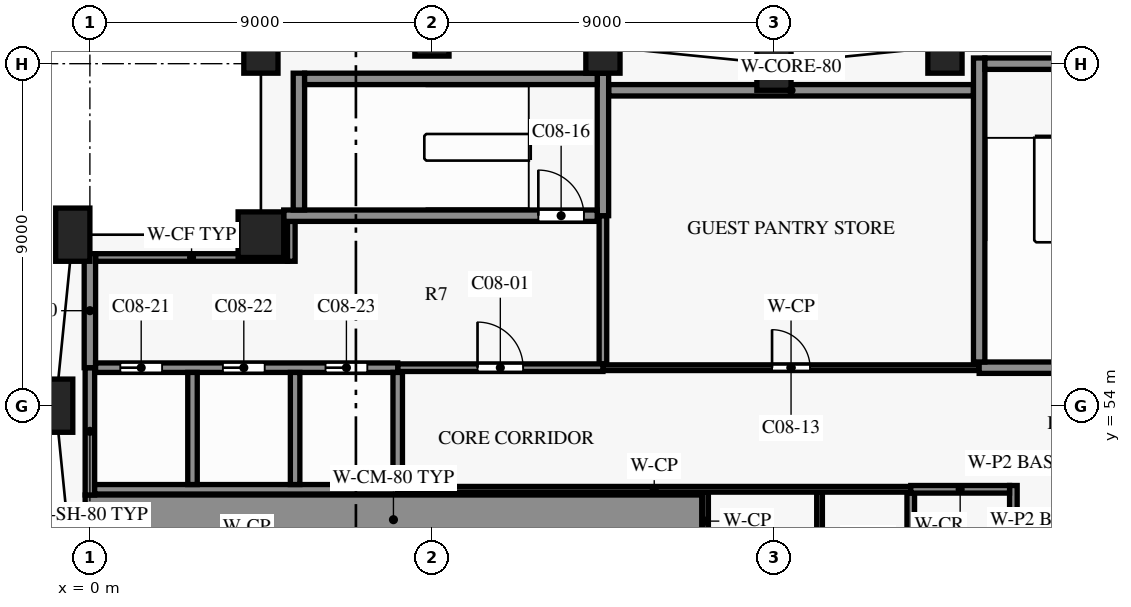
"""IFC4 building model, lengths in metres.
Left out: names, types, materials, properties, quantities, classifications, styles, units other than length and angle.
Written with IfcOpenShell. Run it as: python <this file> out.ifc"""

import sys

from ifc_helpers import new_model, si_unit, direction, frame, frame_2d, origin, origin_2d, place, context, subcontext, project, spatial, rectangle, extrude, element, fill, save


model = new_model("IFC4")
c1 = context("Model", 3, precision=1e-05, world=origin(), true_north=direction((0.0, 1.0)))
c2 = subcontext(c1, "Body", "Model", "MODEL_VIEW")
j1 = project(units=[si_unit("LENGTHUNIT", "METRE"), si_unit("PLANEANGLEUNIT", "RADIAN")], contexts=[c1])
p1 = place(None, origin())
s1 = spatial("IfcSite", under=j1, at=p1, CompositionType="ELEMENT")
p2 = place(p1, origin())
s2 = spatial("IfcBuilding", under=s1, at=p2, CompositionType="ELEMENT")
p3 = place(p2, frame((0.0, 0.0, 41.1)))
s3 = spatial("IfcBuildingStorey", under=s2, at=p3, CompositionType="ELEMENT", Elevation=41.1)
for number, where, z_axis, x_axis in (
    (1, (22.5, 63.45, 0.0), (0.0, 0.0, 1.0), (-0.995, -0.1, 0.0)),
    (2, (18.0, 63.0, 0.0), (0.0, 0.0, 1.0), (-1.0, 0.0, 0.0)),
    (3, (13.5, 63.45, 0.0), (0.0, 0.0, 1.0), (-0.995, 0.1, 0.0)),
    (4, (9.0, 63.9, 0.0), (0.0, 0.0, 1.0), (-1.0, 0.0, 0.0)),
    (5, (4.5, 63.45, 0.0), (0.0, 0.0, 1.0), (-0.995, -0.1, 0.0)),
    (6, (-0.45, 58.5, 0.0), (0.0, 0.0, 1.0), (-0.1, -0.995, 0.0)),
    (7, (-0.9, 54.0, 0.0), (0.0, 0.0, 1.0), (0.0, -1.0, 0.0)),
):
    element("IfcColumn", number, at=place(p3, frame(where, z_axis=z_axis, x_axis=x_axis)), inside=s3, PredefinedType="COLUMN", context=c2, shape_type="SweptSolid", body=[
        extrude(rectangle(XDim=0.9, YDim=1.4, at=origin_2d()), origin(), (0.0, 0.0, 1.0), 3.6),
    ])
p4 = place(p3, frame((4.5, 58.5, 0.0), z_axis=(0.0, 0.0, 1.0), x_axis=(1.0, 0.0, 0.0)))
e8 = element("IfcColumn", 8, at=p4, inside=s3, PredefinedType="COLUMN", context=c2, shape_type="SweptSolid", body=[
    extrude(rectangle(XDim=1.2, YDim=1.2, at=origin_2d()), origin(), (0.0, 0.0, 1.0), 3.6),
])
p5 = place(p3, frame((-0.125, 51.0, 0.0), z_axis=(0.0, 0.0, 1.0), x_axis=(1.0, 0.0, 0.0)))
e9 = element("IfcWall", 9, at=p5, inside=s3, PredefinedType="SHEAR", context=c2, shape_type="SweptSolid", body=[
    extrude(rectangle(XDim=16.225, YDim=1.3, at=frame_2d((8.113, 0.0))), origin(), (0.0, 0.0, 1.0), 3.3),
])
p6 = place(p3, frame((8.1, 51.8, 0.0), z_axis=(0.0, 0.0, 1.0), x_axis=(1.0, 0.0, 0.0)))
e10 = element("IfcWall", 10, at=p6, inside=s3, PredefinedType="PARTITIONING", context=c2, shape_type="SweptSolid", body=[
    extrude(rectangle(XDim=13.5, YDim=0.15, at=frame_2d((6.75, 0.0))), origin(), (0.0, 0.0, 1.0), 3.3),
])
p7 = place(p3, frame((21.6, 51.8, 0.0), z_axis=(0.0, 0.0, 1.0), x_axis=(1.0, 0.0, 0.0)))
e11 = element("IfcWall", 11, at=p7, inside=s3, PredefinedType="PARTITIONING", context=c2, shape_type="SweptSolid", body=[
    extrude(rectangle(XDim=2.6, YDim=0.2, at=frame_2d((1.3, 0.0))), origin(), (0.0, 0.0, 1.0), 3.3),
])
p8 = place(p3, frame((0.125, 51.8, 0.0), z_axis=(0.0, 0.0, 1.0), x_axis=(1.0, 0.0, 0.0)))
e12 = element("IfcWall", 12, at=p8, inside=s3, PredefinedType="SHEAR", context=c2, shape_type="SweptSolid", body=[
    extrude(rectangle(XDim=7.975, YDim=0.25, at=frame_2d((3.988, 0.0))), origin(), (0.0, 0.0, 1.0), 3.3),
])
p9 = place(p3, frame((8.1, 55.0, 0.0), z_axis=(0.0, 0.0, 1.0), x_axis=(1.0, 0.0, 0.0)))
e13 = element("IfcWall", 13, at=p9, inside=s3, PredefinedType="PARTITIONING", context=c2, shape_type="SweptSolid", body=[
    extrude(rectangle(XDim=5.4, YDim=0.2, at=frame_2d((2.7, 0.0))), origin(), (0.0, 0.0, 1.0), 3.3),
])
p10 = place(p9, frame((2.1, 0.0, 0.0)))
e14 = element("IfcOpeningElement", 14, at=p10, cuts=e13, PredefinedType="OPENING", context=c2, shape_type="SweptSolid", body=[
    extrude(rectangle(XDim=1.2, YDim=2.2, at=frame_2d((0.6, 1.1))), frame((0.0, 0.11, 0.0), z_axis=(0.0, -1.0, 0.0), x_axis=(1.0, 0.0, 0.0)), (0.0, 0.0, 1.0), 0.22),
])
p11 = place(p3, frame((13.5, 55.0, 0.0), z_axis=(0.0, 0.0, 1.0), x_axis=(1.0, 0.0, 0.0)))
e15 = element("IfcWall", 15, at=p11, inside=s3, PredefinedType="PARTITIONING", context=c2, shape_type="SweptSolid", body=[
    extrude(rectangle(XDim=9.9, YDim=0.15, at=frame_2d((4.95, 0.0))), origin(), (0.0, 0.0, 1.0), 3.3),
])
p12 = place(p11, frame((4.45, 0.0, 0.0)))
e16 = element("IfcOpeningElement", 16, at=p12, cuts=e15, PredefinedType="OPENING", context=c2, shape_type="SweptSolid", body=[
    extrude(rectangle(XDim=1.0, YDim=2.1, at=frame_2d((0.5, 1.05))), frame((0.0, 0.085, 0.0), z_axis=(0.0, -1.0, 0.0), x_axis=(1.0, 0.0, 0.0)), (0.0, 0.0, 1.0), 0.17),
])
p13 = place(p3, frame((0.15, 55.0, 0.0), z_axis=(0.0, 0.0, 1.0), x_axis=(1.0, 0.0, 0.0)))
e17 = element("IfcWall", 17, at=p13, inside=s3, PredefinedType="SHEAR", context=c2, shape_type="SweptSolid", body=[
    extrude(rectangle(XDim=7.95, YDim=0.25, at=frame_2d((3.975, 0.0))), origin(), (0.0, 0.0, 1.0), 3.3),
])
p14 = place(p13, frame((0.65, 0.0, 0.0)))
e18 = element("IfcOpeningElement", 18, at=p14, cuts=e17, PredefinedType="OPENING", context=c2, shape_type="SweptSolid", body=[
    extrude(rectangle(XDim=1.1, YDim=2.1, at=frame_2d((0.55, 1.05))), frame((0.0, 0.135, 0.0), z_axis=(0.0, -1.0, 0.0), x_axis=(1.0, 0.0, 0.0)), (0.0, 0.0, 1.0), 0.27),
])
p15 = place(p13, frame((3.35, 0.0, 0.0)))
e19 = element("IfcOpeningElement", 19, at=p15, cuts=e17, PredefinedType="OPENING", context=c2, shape_type="SweptSolid", body=[
    extrude(rectangle(XDim=1.1, YDim=2.1, at=frame_2d((0.55, 1.05))), frame((0.0, 0.135, 0.0), z_axis=(0.0, -1.0, 0.0), x_axis=(1.0, 0.0, 0.0)), (0.0, 0.0, 1.0), 0.27),
])
p16 = place(p13, frame((6.05, 0.0, 0.0)))
e20 = element("IfcOpeningElement", 20, at=p16, cuts=e17, PredefinedType="OPENING", context=c2, shape_type="SweptSolid", body=[
    extrude(rectangle(XDim=1.1, YDim=2.1, at=frame_2d((0.55, 1.05))), frame((0.0, 0.135, 0.0), z_axis=(0.0, -1.0, 0.0), x_axis=(1.0, 0.0, 0.0)), (0.0, 0.0, 1.0), 0.27),
])
p17 = place(p3, frame((23.4, 55.0, 0.0), z_axis=(0.0, 0.0, 1.0), x_axis=(1.0, 0.0, 0.0)))
e21 = element("IfcWall", 21, at=p17, inside=s3, PredefinedType="SHEAR", context=c2, shape_type="SweptSolid", body=[
    extrude(rectangle(XDim=3.45, YDim=0.3, at=frame_2d((1.725, 0.0))), origin(), (0.0, 0.0, 1.0), 3.3),
])
p18 = place(p3, frame((0.15, 57.9, 0.0), z_axis=(0.0, 0.0, 1.0), x_axis=(1.0, 0.0, 0.0)))
e22 = element("IfcWall", 22, at=p18, inside=s3, PredefinedType="PARTITIONING", context=c2, shape_type="SweptSolid", body=[
    extrude(rectangle(XDim=5.05, YDim=0.2, at=frame_2d((2.525, 0.0))), origin(), (0.0, 0.0, 1.0), 3.3),
])
p19 = place(p3, frame((5.1, 59.0, 0.0), z_axis=(0.0, 0.0, 1.0), x_axis=(1.0, 0.0, 0.0)))
e23 = element("IfcWall", 23, at=p19, inside=s3, PredefinedType="SHEAR", context=c2, shape_type="SweptSolid", body=[
    extrude(rectangle(XDim=8.25, YDim=0.3, at=frame_2d((4.125, 0.0))), origin(), (0.0, 0.0, 1.0), 3.3),
])
p20 = place(p19, frame((6.7, 0.0, 0.0)))
e24 = element("IfcOpeningElement", 24, at=p20, cuts=e23, PredefinedType="OPENING", context=c2, shape_type="SweptSolid", body=[
    extrude(rectangle(XDim=1.2, YDim=2.2, at=frame_2d((0.6, 1.1))), frame((0.0, 0.16, 0.0), z_axis=(0.0, -1.0, 0.0), x_axis=(1.0, 0.0, 0.0)), (0.0, 0.0, 1.0), 0.32),
])
p21 = place(p3, frame((13.65, 62.3, 0.0), z_axis=(0.0, 0.0, 1.0), x_axis=(1.0, 0.0, 0.0)))
e25 = element("IfcWall", 25, at=p21, inside=s3, PredefinedType="SHEAR", context=c2, shape_type="SweptSolid", body=[
    extrude(rectangle(XDim=9.6, YDim=0.3, at=frame_2d((4.8, 0.0))), origin(), (0.0, 0.0, 1.0), 3.3),
])
p22 = place(p3, frame((5.65, 62.6, 0.0), z_axis=(0.0, 0.0, 1.0), x_axis=(1.0, 0.0, 0.0)))
e26 = element("IfcWall", 26, at=p22, inside=s3, PredefinedType="SHEAR", context=c2, shape_type="SweptSolid", body=[
    extrude(rectangle(XDim=7.7, YDim=0.3, at=frame_2d((3.85, 0.0))), origin(), (0.0, 0.0, 1.0), 3.3),
])
p23 = place(p3, frame((23.55, 63.0, 0.0), z_axis=(0.0, 0.0, 1.0), x_axis=(1.0, 0.0, 0.0)))
e27 = element("IfcWall", 27, at=p23, inside=s3, PredefinedType="SHEAR", context=c2, shape_type="SweptSolid", body=[
    extrude(rectangle(XDim=3.3, YDim=0.3, at=frame_2d((1.65, 0.0))), origin(), (0.0, 0.0, 1.0), 3.3),
])
p24 = place(p3, frame((0.0, 55.0, 0.0), z_axis=(0.0, 0.0, 1.0), x_axis=(0.0, 1.0, 0.0)))
e28 = element("IfcWall", 28, at=p24, inside=s3, PredefinedType="SHEAR", context=c2, shape_type="SweptSolid", body=[
    extrude(rectangle(XDim=3.0, YDim=0.3, at=frame_2d((1.5, 0.0))), origin(), (0.0, 0.0, 1.0), 3.3),
])
p25 = place(p3, frame((0.0, 51.65, 0.0), z_axis=(0.0, 0.0, 1.0), x_axis=(0.0, 1.0, 0.0)))
e29 = element("IfcWall", 29, at=p25, inside=s3, PredefinedType="SHEAR", context=c2, shape_type="SweptSolid", body=[
    extrude(rectangle(XDim=3.35, YDim=0.25, at=frame_2d((1.675, 0.0))), origin(), (0.0, 0.0, 1.0), 3.3),
])
p26 = place(p3, frame((2.7, 51.925, 0.0), z_axis=(0.0, 0.0, 1.0), x_axis=(0.0, 1.0, 0.0)))
e30 = element("IfcWall", 30, at=p26, inside=s3, PredefinedType="SHEAR", context=c2, shape_type="SweptSolid", body=[
    extrude(rectangle(XDim=2.95, YDim=0.25, at=frame_2d((1.475, 0.0))), origin(), (0.0, 0.0, 1.0), 3.3),
])
p27 = place(p3, frame((5.3, 57.8, 0.0), z_axis=(0.0, 0.0, 1.0), x_axis=(0.0, 1.0, 0.0)))
e31 = element("IfcWall", 31, at=p27, inside=s3, PredefinedType="PARTITIONING", context=c2, shape_type="SweptSolid", body=[
    extrude(rectangle(XDim=1.05, YDim=0.2, at=frame_2d((0.525, 0.0))), origin(), (0.0, 0.0, 1.0), 3.3),
])
p28 = place(p3, frame((5.4, 51.925, 0.0), z_axis=(0.0, 0.0, 1.0), x_axis=(0.0, 1.0, 0.0)))
e32 = element("IfcWall", 32, at=p28, inside=s3, PredefinedType="SHEAR", context=c2, shape_type="SweptSolid", body=[
    extrude(rectangle(XDim=2.95, YDim=0.25, at=frame_2d((1.475, 0.0))), origin(), (0.0, 0.0, 1.0), 3.3),
])
p29 = place(p3, frame((5.5, 59.15, 0.0), z_axis=(0.0, 0.0, 1.0), x_axis=(0.0, 1.0, 0.0)))
e33 = element("IfcWall", 33, at=p29, inside=s3, PredefinedType="SHEAR", context=c2, shape_type="SweptSolid", body=[
    extrude(rectangle(XDim=3.6, YDim=0.3, at=frame_2d((1.8, 0.0))), origin(), (0.0, 0.0, 1.0), 3.3),
])
p30 = place(p3, frame((8.1, 51.925, 0.0), z_axis=(0.0, 0.0, 1.0), x_axis=(0.0, 1.0, 0.0)))
e34 = element("IfcWall", 34, at=p30, inside=s3, PredefinedType="SHEAR", context=c2, shape_type="SweptSolid", body=[
    extrude(rectangle(XDim=2.95, YDim=0.25, at=frame_2d((1.475, 0.0))), origin(), (0.0, 0.0, 1.0), 3.3),
])
p31 = place(p3, frame((13.5, 55.1, 0.0), z_axis=(0.0, 0.0, 1.0), x_axis=(0.0, 1.0, 0.0)))
e35 = element("IfcWall", 35, at=p31, inside=s3, PredefinedType="PARTITIONING", context=c2, shape_type="SweptSolid", body=[
    extrude(rectangle(XDim=3.9, YDim=0.2, at=frame_2d((1.95, 0.0))), origin(), (0.0, 0.0, 1.0), 3.3),
])
p32 = place(p3, frame((13.5, 59.0, 0.0), z_axis=(0.0, 0.0, 1.0), x_axis=(0.0, 1.0, 0.0)))
e36 = element("IfcWall", 36, at=p32, inside=s3, PredefinedType="SHEAR", context=c2, shape_type="SweptSolid", body=[
    extrude(rectangle(XDim=3.75, YDim=0.3, at=frame_2d((1.875, 0.0))), origin(), (0.0, 0.0, 1.0), 3.3),
])
p33 = place(p3, frame((16.2, 50.2, 0.0), z_axis=(0.0, 0.0, 1.0), x_axis=(0.0, 1.0, 0.0)))
e37 = element("IfcWall", 37, at=p33, inside=s3, PredefinedType="PARTITIONING", context=c2, shape_type="SweptSolid", body=[
    extrude(rectangle(XDim=1.525, YDim=0.15, at=frame_2d((0.763, 0.0))), origin(), (0.0, 0.0, 1.0), 3.3),
])
p34 = place(p3, frame((19.2, 47.1, 0.0), z_axis=(0.0, 0.0, 1.0), x_axis=(0.0, 1.0, 0.0)))
e38 = element("IfcWall", 38, at=p34, inside=s3, PredefinedType="PARTITIONING", context=c2, shape_type="SweptSolid", body=[
    extrude(rectangle(XDim=4.625, YDim=0.15, at=frame_2d((2.312, 0.0))), origin(), (0.0, 0.0, 1.0), 3.3),
])
p35 = place(p3, frame((21.6, 47.1, 0.0), z_axis=(0.0, 0.0, 1.0), x_axis=(0.0, 1.0, 0.0)))
e39 = element("IfcWall", 39, at=p35, inside=s3, PredefinedType="PARTITIONING", context=c2, shape_type="SweptSolid", body=[
    extrude(rectangle(XDim=4.6, YDim=0.2, at=frame_2d((2.3, 0.0))), origin(), (0.0, 0.0, 1.0), 3.3),
])
p36 = place(p3, frame((23.4, 55.15, 0.0), z_axis=(0.0, 0.0, 1.0), x_axis=(0.0, 1.0, 0.0)))
e40 = element("IfcWall", 40, at=p36, inside=s3, PredefinedType="SHEAR", context=c2, shape_type="SweptSolid", body=[
    extrude(rectangle(XDim=8.0, YDim=0.3, at=frame_2d((4.0, 0.0))), origin(), (0.0, 0.0, 1.0), 3.3),
])
p37 = place(p3, frame((24.3, 46.9, 0.0), z_axis=(0.0, 0.0, 1.0), x_axis=(0.0, 1.0, 0.0)))
e41 = element("IfcWall", 41, at=p37, inside=s3, PredefinedType="SHEAR", context=c2, shape_type="SweptSolid", body=[
    extrude(rectangle(XDim=5.0, YDim=0.2, at=frame_2d((2.5, 0.0))), origin(), (0.0, 0.0, 1.0), 3.3),
])
p38 = place(p10, origin())
e42 = element("IfcDoor", 42, at=p38, inside=s3, OperationType="SINGLE_SWING_RIGHT", PredefinedType="DOOR", context=c2, shape_type="SweptSolid", body=[
    extrude(rectangle(XDim=1.2, YDim=2.2, at=frame_2d((0.6, 1.1))), frame((0.0, 0.025, 0.0), z_axis=(0.0, -1.0, 0.0), x_axis=(1.0, 0.0, 0.0)), (0.0, 0.0, 1.0), 0.05),
])
fill(e14, e42)
p39 = place(p12, origin())
e43 = element("IfcDoor", 43, at=p39, inside=s3, OperationType="SINGLE_SWING_LEFT", PredefinedType="DOOR", context=c2, shape_type="SweptSolid", body=[
    extrude(rectangle(XDim=1.0, YDim=2.1, at=frame_2d((0.5, 1.05))), frame((0.0, 0.025, 0.0), z_axis=(0.0, -1.0, 0.0), x_axis=(1.0, 0.0, 0.0)), (0.0, 0.0, 1.0), 0.05),
])
fill(e16, e43)
p40 = place(p20, origin())
e44 = element("IfcDoor", 44, at=p40, inside=s3, OperationType="SINGLE_SWING_RIGHT", PredefinedType="DOOR", context=c2, shape_type="SweptSolid", body=[
    extrude(rectangle(XDim=1.2, YDim=2.2, at=frame_2d((0.6, 1.1))), frame((0.0, 0.025, 0.0), z_axis=(0.0, -1.0, 0.0), x_axis=(1.0, 0.0, 0.0)), (0.0, 0.0, 1.0), 0.05),
])
fill(e24, e44)
p41 = place(p14, origin())
e45 = element("IfcDoor", 45, at=p41, inside=s3, OperationType="DOUBLE_DOOR_SLIDING", PredefinedType="DOOR", context=c2, shape_type="SweptSolid", body=[
    extrude(rectangle(XDim=1.1, YDim=2.1, at=frame_2d((0.55, 1.05))), frame((0.0, 0.025, 0.0), z_axis=(0.0, -1.0, 0.0), x_axis=(1.0, 0.0, 0.0)), (0.0, 0.0, 1.0), 0.05),
])
fill(e18, e45)
p42 = place(p15, origin())
e46 = element("IfcDoor", 46, at=p42, inside=s3, OperationType="DOUBLE_DOOR_SLIDING", PredefinedType="DOOR", context=c2, shape_type="SweptSolid", body=[
    extrude(rectangle(XDim=1.1, YDim=2.1, at=frame_2d((0.55, 1.05))), frame((0.0, 0.025, 0.0), z_axis=(0.0, -1.0, 0.0), x_axis=(1.0, 0.0, 0.0)), (0.0, 0.0, 1.0), 0.05),
])
fill(e19, e46)
p43 = place(p16, origin())
e47 = element("IfcDoor", 47, at=p43, inside=s3, OperationType="DOUBLE_DOOR_SLIDING", PredefinedType="DOOR", context=c2, shape_type="SweptSolid", body=[
    extrude(rectangle(XDim=1.1, YDim=2.1, at=frame_2d((0.55, 1.05))), frame((0.0, 0.025, 0.0), z_axis=(0.0, -1.0, 0.0), x_axis=(1.0, 0.0, 0.0)), (0.0, 0.0, 1.0), 0.05),
])
fill(e20, e47)
save(model, sys.argv[1])
